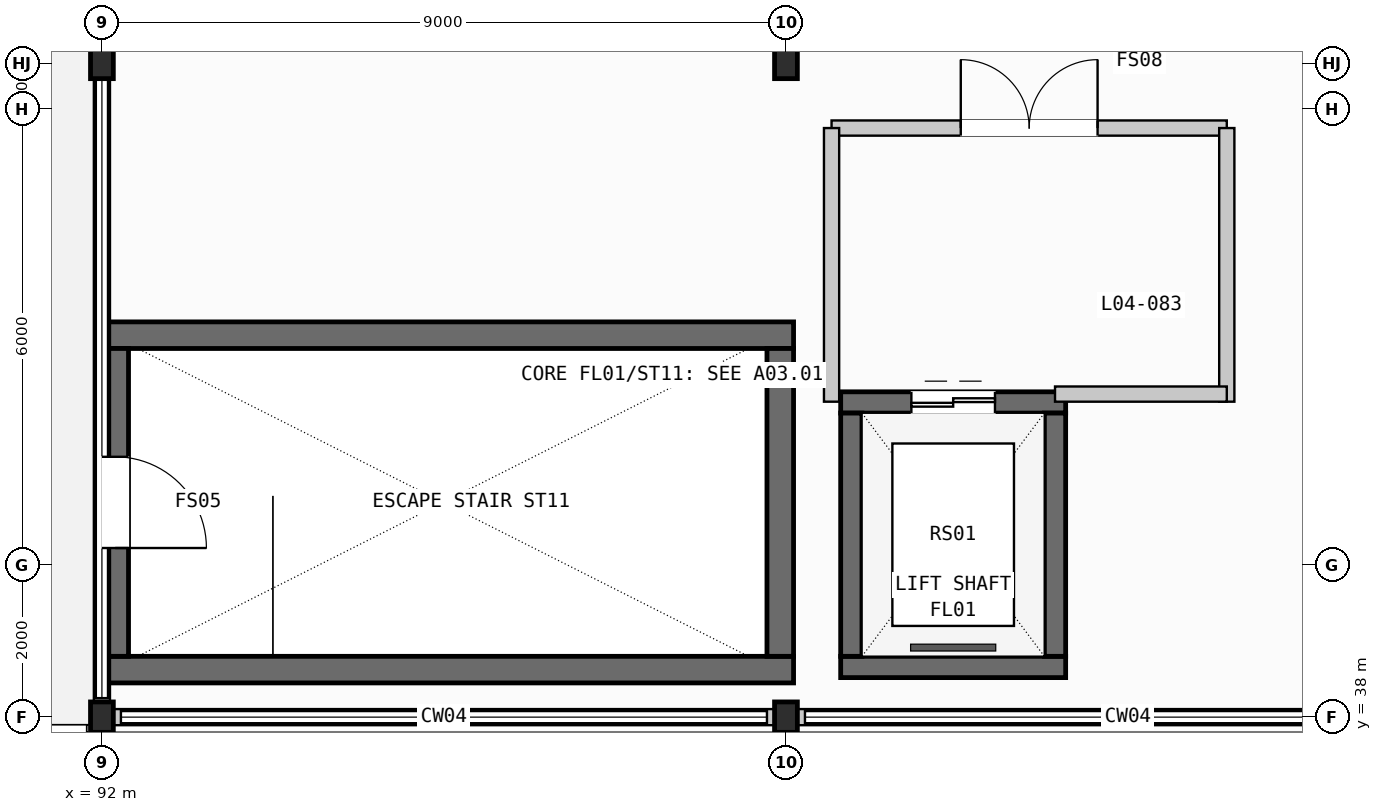
"""IFC4 building model, lengths in metres.
Left out: names, types, materials, properties, quantities, classifications, styles, units other than length and angle.
Written with IfcOpenShell. Run it as: python <this file> out.ifc"""

import sys

from ifc_helpers import new_model, si_unit, direction, frame, frame_2d, origin, origin_2d, place, context, subcontext, project, spatial, rectangle, i_section, extrude, element, fill, save


model = new_model("IFC4")
c1 = context("Model", 3, precision=1e-05, world=origin(), true_north=direction((0.0, 1.0)))
c2 = subcontext(c1, "Body", "Model", "MODEL_VIEW")
j1 = project(units=[si_unit("LENGTHUNIT", "METRE"), si_unit("PLANEANGLEUNIT", "RADIAN")], contexts=[c1])
p1 = place(None, origin())
s1 = spatial("IfcSite", under=j1, at=p1, CompositionType="ELEMENT")
p2 = place(p1, origin())
s2 = spatial("IfcBuilding", under=s1, at=p2, CompositionType="ELEMENT")
p3 = place(p2, frame((0.0, 0.0, 21.6)))
s3 = spatial("IfcBuildingStorey", under=s2, at=p3, CompositionType="ELEMENT", Elevation=21.6)
for number, where, z_axis, x_axis in (
    (1, (92.0, 38.0, 0.0), (0.0, 0.0, 1.0), (1.0, 0.0, 0.0)),
    (2, (92.0, 46.6, 0.0), (0.0, 0.0, 1.0), (1.0, 0.0, 0.0)),
    (3, (101.0, 38.0, 0.0), (0.0, 0.0, 1.0), (1.0, 0.0, 0.0)),
    (4, (101.0, 46.6, 0.0), (0.0, 0.0, 1.0), (1.0, 0.0, 0.0)),
):
    element("IfcColumn", number, at=place(p3, frame(where, z_axis=z_axis, x_axis=x_axis)), inside=s3, PredefinedType="COLUMN", context=c2, shape_type="SweptSolid", body=[
        extrude(i_section(OverallWidth=0.3, OverallDepth=0.4, WebThickness=0.013, FlangeThickness=0.024, FilletRadius=0.027, at=origin_2d()), origin(), (0.0, 0.0, 1.0), 4.8),
    ])
for number, where, z_axis, x_axis in (
    (5, (92.0, 38.625, 0.0), (0.0, 0.0, 1.0), (1.0, 0.0, 0.0)),
    (6, (92.0, 43.025, 0.0), (0.0, 0.0, 1.0), (1.0, 0.0, 0.0)),
):
    element("IfcWall", number, at=place(p3, frame(where, z_axis=z_axis, x_axis=x_axis)), inside=s3, PredefinedType="SHEAR", context=c2, shape_type="SweptSolid", body=[
        extrude(rectangle(XDim=9.1, YDim=0.35, at=frame_2d((4.55, 0.0))), origin(), (0.0, 0.0, 1.0), 4.2),
    ])
p4 = place(p3, frame((92.175, 38.8, 0.0), z_axis=(0.0, 0.0, 1.0), x_axis=(0.0, 1.0, 0.0)))
e7 = element("IfcWall", 7, at=p4, inside=s3, PredefinedType="SHEAR", context=c2, shape_type="SweptSolid", body=[
    extrude(rectangle(XDim=4.05, YDim=0.35, at=frame_2d((2.025, 0.0))), origin(), (0.0, 0.0, 1.0), 4.2),
])
p5 = place(p4, frame((1.425, 0.0, 0.0)))
e8 = element("IfcOpeningElement", 8, at=p5, cuts=e7, PredefinedType="OPENING", context=c2, shape_type="SweptSolid", body=[
    extrude(rectangle(XDim=1.2, YDim=2.2, at=frame_2d((0.6, 1.1))), frame((0.0, 0.185, 0.0), z_axis=(0.0, -1.0, 0.0), x_axis=(1.0, 0.0, 0.0)), (0.0, 0.0, 1.0), 0.37),
])
p6 = place(p3, frame((100.925, 38.8, 0.0), z_axis=(0.0, 0.0, 1.0), x_axis=(0.0, 1.0, 0.0)))
e9 = element("IfcWall", 9, at=p6, inside=s3, PredefinedType="SHEAR", context=c2, shape_type="SweptSolid", body=[
    extrude(rectangle(XDim=4.05, YDim=0.35, at=frame_2d((2.025, 0.0))), origin(), (0.0, 0.0, 1.0), 4.2),
])
p7 = place(p3, frame((101.72, 38.66, 0.0), z_axis=(0.0, 0.0, 1.0), x_axis=(1.0, 0.0, 0.0)))
e10 = element("IfcWall", 10, at=p7, inside=s3, PredefinedType="SHEAR", context=c2, shape_type="SweptSolid", body=[
    extrude(rectangle(XDim=2.96, YDim=0.28, at=frame_2d((1.48, 0.0))), origin(), (0.0, 0.0, 1.0), 4.2),
])
p8 = place(p3, frame((101.72, 42.14, 0.0), z_axis=(0.0, 0.0, 1.0), x_axis=(1.0, 0.0, 0.0)))
e11 = element("IfcWall", 11, at=p8, inside=s3, PredefinedType="SHEAR", context=c2, shape_type="SweptSolid", body=[
    extrude(rectangle(XDim=2.96, YDim=0.28, at=frame_2d((1.48, 0.0))), origin(), (0.0, 0.0, 1.0), 4.2),
])
p9 = place(p8, frame((0.93, 0.0, 0.0)))
e12 = element("IfcOpeningElement", 12, at=p9, cuts=e11, PredefinedType="OPENING", context=c2, shape_type="SweptSolid", body=[
    extrude(rectangle(XDim=1.1, YDim=2.15, at=frame_2d((0.55, 1.075))), frame((0.0, 0.15, 0.0), z_axis=(0.0, -1.0, 0.0), x_axis=(1.0, 0.0, 0.0)), (0.0, 0.0, 1.0), 0.3),
])
for number, where, z_axis, x_axis in (
    (13, (101.86, 38.8, 0.0), (0.0, 0.0, 1.0), (0.0, 1.0, 0.0)),
    (14, (104.54, 38.8, 0.0), (0.0, 0.0, 1.0), (0.0, 1.0, 0.0)),
):
    element("IfcWall", number, at=place(p3, frame(where, z_axis=z_axis, x_axis=x_axis)), inside=s3, PredefinedType="SHEAR", context=c2, shape_type="SweptSolid", body=[
        extrude(rectangle(XDim=3.2, YDim=0.28, at=frame_2d((1.6, 0.0))), origin(), (0.0, 0.0, 1.0), 4.2),
    ])
p10 = place(p3, frame((92.0, 38.0, 4.8), z_axis=(0.0, 0.0, 1.0), x_axis=(1.0, 0.0, 0.0)))
e15 = element("IfcWall", 15, at=p10, inside=s3, PredefinedType="PARAPET", context=c2, shape_type="SweptSolid", body=[
    extrude(rectangle(XDim=54.4, YDim=0.212, at=frame_2d((27.2, 0.0))), origin(), (0.0, 0.0, 1.0), 0.95),
])
p11 = place(p3, frame((92.0, 38.08, 4.8), z_axis=(0.0, 0.0, 1.0), x_axis=(0.0, 1.0, 0.0)))
e16 = element("IfcWall", 16, at=p11, inside=s3, PredefinedType="PARAPET", context=c2, shape_type="SweptSolid", body=[
    extrude(rectangle(XDim=16.74, YDim=0.212, at=frame_2d((8.37, 0.0))), origin(), (0.0, 0.0, 1.0), 0.95),
])
p12 = place(p3, frame((101.6, 45.75, 0.0), z_axis=(0.0, 0.0, 1.0), x_axis=(1.0, 0.0, 0.0)))
e17 = element("IfcWall", 17, at=p12, inside=s3, PredefinedType="PARTITIONING", context=c2, shape_type="SweptSolid", body=[
    extrude(rectangle(XDim=5.2, YDim=0.2, at=frame_2d((2.6, 0.0))), origin(), (0.0, 0.0, 1.0), 4.0),
])
p13 = place(p12, frame((1.7, 0.0, 0.0)))
e18 = element("IfcOpeningElement", 18, at=p13, cuts=e17, PredefinedType="OPENING", context=c2, shape_type="SweptSolid", body=[
    extrude(rectangle(XDim=1.8, YDim=2.2, at=frame_2d((0.9, 1.1))), frame((0.0, 0.11, 0.0), z_axis=(0.0, -1.0, 0.0), x_axis=(1.0, 0.0, 0.0)), (0.0, 0.0, 1.0), 0.22),
])
for number, where, z_axis, x_axis in (
    (19, (101.6, 42.15, 0.0), (0.0, 0.0, 1.0), (0.0, 1.0, 0.0)),
    (20, (106.8, 42.15, 0.0), (0.0, 0.0, 1.0), (0.0, 1.0, 0.0)),
):
    element("IfcWall", number, at=place(p3, frame(where, z_axis=z_axis, x_axis=x_axis)), inside=s3, PredefinedType="PARTITIONING", context=c2, shape_type="SweptSolid", body=[
        extrude(rectangle(XDim=3.6, YDim=0.2, at=frame_2d((1.8, 0.0))), origin(), (0.0, 0.0, 1.0), 4.0),
    ])
p14 = place(p3, frame((104.54, 42.25, 0.0), z_axis=(0.0, 0.0, 1.0), x_axis=(1.0, 0.0, 0.0)))
e21 = element("IfcWall", 21, at=p14, inside=s3, PredefinedType="PARTITIONING", context=c2, shape_type="SweptSolid", body=[
    extrude(rectangle(XDim=2.26, YDim=0.2, at=frame_2d((1.13, 0.0))), origin(), (0.0, 0.0, 1.0), 4.0),
])
p15 = place(p5, frame((1.2, 0.0, 0.0), z_axis=(0.0, 0.0, 1.0), x_axis=(-1.0, 0.0, 0.0)))
e22 = element("IfcDoor", 22, at=p15, inside=s3, OperationType="SINGLE_SWING_RIGHT", PredefinedType="DOOR", context=c2, shape_type="SweptSolid", body=[
    extrude(rectangle(XDim=1.2, YDim=2.2, at=frame_2d((0.6, 1.1))), frame((0.0, 0.025, 0.0), z_axis=(0.0, -1.0, 0.0), x_axis=(1.0, 0.0, 0.0)), (0.0, 0.0, 1.0), 0.05),
])
fill(e8, e22)
p16 = place(p9, origin())
e23 = element("IfcDoor", 23, at=p16, inside=s3, OperationType="DOUBLE_DOOR_SLIDING", PredefinedType="DOOR", context=c2, shape_type="SweptSolid", body=[
    extrude(rectangle(XDim=1.1, YDim=2.15, at=frame_2d((0.55, 1.075))), frame((0.0, 0.025, 0.0), z_axis=(0.0, -1.0, 0.0), x_axis=(1.0, 0.0, 0.0)), (0.0, 0.0, 1.0), 0.05),
])
fill(e12, e23)
p17 = place(p13, origin())
e24 = element("IfcDoor", 24, at=p17, inside=s3, OperationType="DOUBLE_DOOR_SINGLE_SWING", PredefinedType="DOOR", context=c2, shape_type="SweptSolid", body=[
    extrude(rectangle(XDim=1.8, YDim=2.2, at=frame_2d((0.9, 1.1))), frame((0.0, 0.025, 0.0), z_axis=(0.0, -1.0, 0.0), x_axis=(1.0, 0.0, 0.0)), (0.0, 0.0, 1.0), 0.05),
])
fill(e18, e24)
save(model, sys.argv[1])
